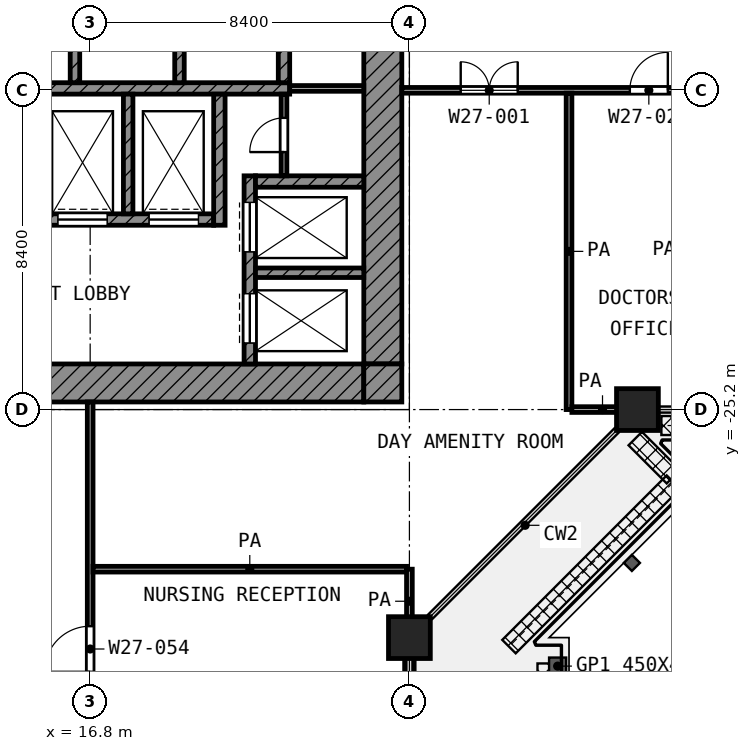
"""IFC4 building model, lengths in metres.
Left out: names, types, materials, properties, quantities, classifications, styles, units other than length and angle.
Written with IfcOpenShell. Run it as: python <this file> out.ifc"""

import sys

from ifc_helpers import new_model, si_unit, direction, frame, frame_2d, origin, origin_2d, place, context, subcontext, project, spatial, rectangle, extrude, element, fill, save


model = new_model("IFC4")
c1 = context("Model", 3, precision=1e-05, world=origin(), true_north=direction((0.0, 1.0)))
c2 = subcontext(c1, "Body", "Model", "MODEL_VIEW")
j1 = project(units=[si_unit("LENGTHUNIT", "METRE"), si_unit("PLANEANGLEUNIT", "RADIAN")], contexts=[c1])
p1 = place(None, origin())
s1 = spatial("IfcSite", under=j1, at=p1, CompositionType="ELEMENT")
p2 = place(p1, origin())
s2 = spatial("IfcBuilding", under=s1, at=p2, CompositionType="ELEMENT")
p3 = place(p2, frame((0.0, 0.0, 140.8)))
s3 = spatial("IfcBuildingStorey", under=s2, at=p3, CompositionType="ELEMENT", Elevation=140.8)
for number, where, z_axis, x_axis in (
    (1, (31.2, -25.2, 0.0), (0.0, 0.0, 1.0), (1.0, 0.0, 0.0)),
    (2, (25.2, -31.2, 0.0), (0.0, 0.0, 1.0), (1.0, 0.0, 0.0)),
):
    element("IfcColumn", number, at=place(p3, frame(where, z_axis=z_axis, x_axis=x_axis)), inside=s3, PredefinedType="COLUMN", context=c2, shape_type="SweptSolid", body=[
        extrude(rectangle(XDim=1.1, YDim=1.1, at=origin_2d()), origin(), (0.0, 0.0, 1.0), 4.2),
    ])
p4 = place(p3, frame((25.2, -34.992, 0.0), z_axis=(0.0, 0.0, 1.0), x_axis=(0.0, 1.0, 0.0)))
e3 = element("IfcWall", 3, at=p4, inside=s3, PredefinedType="SOLIDWALL", context=c2, shape_type="SweptSolid", body=[
    extrude(rectangle(XDim=3.242, YDim=0.25, at=frame_2d((1.621, 0.0))), origin(), (0.0, 0.0, 1.0), 3.48),
])
p5 = place(p4, frame((1.621, 0.0, 0.0)))
e4 = element("IfcOpeningElement", 4, at=p5, cuts=e3, PredefinedType="OPENING", context=c2, shape_type="SweptSolid", body=[
    extrude(rectangle(XDim=1.0, YDim=2.1, at=frame_2d((0.5, 1.05))), frame((0.0, 0.135, 0.0), z_axis=(0.0, -1.0, 0.0), x_axis=(1.0, 0.0, 0.0)), (0.0, 0.0, 1.0), 0.27),
])
p6 = place(p3, frame((24.5, -24.0, 0.0), z_axis=(0.0, 0.0, 1.0), x_axis=(0.0, 1.0, 0.0)))
e5 = element("IfcWall", 5, at=p6, inside=s3, PredefinedType="SHEAR", context=c2, shape_type="SweptSolid", body=[
    extrude(rectangle(XDim=18.6, YDim=1.0, at=frame_2d((9.3, 0.0))), origin(), (0.0, 0.0, 1.0), 3.6),
])
p7 = place(p6, frame((10.5, 0.0, 0.0)))
e6 = element("IfcOpeningElement", 6, at=p7, cuts=e5, PredefinedType="OPENING", context=c2, shape_type="SweptSolid", body=[
    extrude(rectangle(XDim=1.8, YDim=2.1, at=frame_2d((0.9, 1.05))), frame((0.0, 0.51, 0.0), z_axis=(0.0, -1.0, 0.0), x_axis=(1.0, 0.0, 0.0)), (0.0, 0.0, 1.0), 1.02),
])
p8 = place(p3, frame((5.4, -24.5, 0.0), z_axis=(0.0, 0.0, 1.0), x_axis=(1.0, 0.0, 0.0)))
e7 = element("IfcWall", 7, at=p8, inside=s3, PredefinedType="SHEAR", context=c2, shape_type="SweptSolid", body=[
    extrude(rectangle(XDim=18.6, YDim=1.0, at=frame_2d((9.3, 0.0))), origin(), (0.0, 0.0, 1.0), 3.6),
])
p9 = place(p8, frame((6.3, 0.0, 0.0)))
e8 = element("IfcOpeningElement", 8, at=p9, cuts=e7, PredefinedType="OPENING", context=c2, shape_type="SweptSolid", body=[
    extrude(rectangle(XDim=1.8, YDim=2.1, at=frame_2d((0.9, 1.05))), frame((0.0, 0.51, 0.0), z_axis=(0.0, -1.0, 0.0), x_axis=(1.0, 0.0, 0.0)), (0.0, 0.0, 1.0), 1.02),
])
p10 = place(p3, frame((24.5, -25.0, 0.0), z_axis=(0.0, 0.0, 1.0), x_axis=(0.0, 1.0, 0.0)))
e9 = element("IfcWall", 9, at=p10, inside=s3, PredefinedType="SHEAR", context=c2, shape_type="SweptSolid", body=[
    extrude(rectangle(XDim=1.0, YDim=1.0, at=frame_2d((0.5, 0.0))), origin(), (0.0, 0.0, 1.0), 3.6),
])
p11 = place(p3, frame((5.4, -16.75, 0.0), z_axis=(0.0, 0.0, 1.0), x_axis=(1.0, 0.0, 0.0)))
e10 = element("IfcWall", 10, at=p11, inside=s3, PredefinedType="SHEAR", context=c2, shape_type="SweptSolid", body=[
    extrude(rectangle(XDim=16.65, YDim=0.3, at=frame_2d((8.325, 0.0))), origin(), (0.0, 0.0, 1.0), 3.6),
])
p12 = place(p3, frame((5.4, -20.2, 0.0), z_axis=(0.0, 0.0, 1.0), x_axis=(1.0, 0.0, 0.0)))
e11 = element("IfcWall", 11, at=p12, inside=s3, PredefinedType="SHEAR", context=c2, shape_type="SweptSolid", body=[
    extrude(rectangle(XDim=14.65, YDim=0.3, at=frame_2d((7.325, 0.0))), origin(), (0.0, 0.0, 1.0), 3.6),
])
p13 = place(p12, frame((10.55, 0.0, 0.0)))
e12 = element("IfcOpeningElement", 12, at=p13, cuts=e11, PredefinedType="OPENING", context=c2, shape_type="SweptSolid", body=[
    extrude(rectangle(XDim=1.3, YDim=2.1, at=frame_2d((0.65, 1.05))), frame((0.0, 0.16, 0.0), z_axis=(0.0, -1.0, 0.0), x_axis=(1.0, 0.0, 0.0)), (0.0, 0.0, 1.0), 0.32),
])
p14 = place(p12, frame((12.95, 0.0, 0.0)))
e13 = element("IfcOpeningElement", 13, at=p14, cuts=e11, PredefinedType="OPENING", context=c2, shape_type="SweptSolid", body=[
    extrude(rectangle(XDim=1.3, YDim=2.1, at=frame_2d((0.65, 1.05))), frame((0.0, 0.16, 0.0), z_axis=(0.0, -1.0, 0.0), x_axis=(1.0, 0.0, 0.0)), (0.0, 0.0, 1.0), 0.32),
])
p15 = place(p12, frame((0.55, 0.0, 0.0)))
e14 = element("IfcOpeningElement", 14, at=p15, cuts=e11, PredefinedType="OPENING", context=c2, shape_type="SweptSolid", body=[
    extrude(rectangle(XDim=1.3, YDim=2.1, at=frame_2d((0.65, 1.05))), frame((0.0, 0.16, 0.0), z_axis=(0.0, -1.0, 0.0), x_axis=(1.0, 0.0, 0.0)), (0.0, 0.0, 1.0), 0.32),
])
p16 = place(p12, frame((2.95, 0.0, 0.0)))
e15 = element("IfcOpeningElement", 15, at=p16, cuts=e11, PredefinedType="OPENING", context=c2, shape_type="SweptSolid", body=[
    extrude(rectangle(XDim=1.3, YDim=2.1, at=frame_2d((0.65, 1.05))), frame((0.0, 0.16, 0.0), z_axis=(0.0, -1.0, 0.0), x_axis=(1.0, 0.0, 0.0)), (0.0, 0.0, 1.0), 0.32),
])
p17 = place(p12, frame((7.15, 0.0, 0.0)))
e16 = element("IfcOpeningElement", 16, at=p17, cuts=e11, PredefinedType="OPENING", context=c2, shape_type="SweptSolid", body=[
    extrude(rectangle(XDim=0.9, YDim=2.1, at=frame_2d((0.45, 1.05))), frame((0.0, 0.16, 0.0), z_axis=(0.0, -1.0, 0.0), x_axis=(1.0, 0.0, 0.0)), (0.0, 0.0, 1.0), 0.32),
])
p18 = place(p3, frame((20.2, -20.35, 0.0), z_axis=(0.0, 0.0, 1.0), x_axis=(0.0, 1.0, 0.0)))
e17 = element("IfcWall", 17, at=p18, inside=s3, PredefinedType="SHEAR", context=c2, shape_type="SweptSolid", body=[
    extrude(rectangle(XDim=3.45, YDim=0.3, at=frame_2d((1.725, 0.0))), origin(), (0.0, 0.0, 1.0), 3.6),
])
p19 = place(p3, frame((21.9, -16.6, 0.0), z_axis=(0.0, 0.0, 1.0), x_axis=(0.0, 1.0, 0.0)))
e18 = element("IfcWall", 18, at=p19, inside=s3, PredefinedType="SHEAR", context=c2, shape_type="SweptSolid", body=[
    extrude(rectangle(XDim=2.35, YDim=0.3, at=frame_2d((1.175, 0.0))), origin(), (0.0, 0.0, 1.0), 3.6),
])
p20 = place(p3, frame((21.15, -19.2, 0.0), z_axis=(0.0, 0.0, 1.0), x_axis=(1.0, 0.0, 0.0)))
e19 = element("IfcWall", 19, at=p20, inside=s3, PredefinedType="SHEAR", context=c2, shape_type="SweptSolid", body=[
    extrude(rectangle(XDim=2.85, YDim=0.3, at=frame_2d((1.425, 0.0))), origin(), (0.0, 0.0, 1.0), 3.6),
])
p21 = place(p3, frame((21.0, -24.0, 0.0), z_axis=(0.0, 0.0, 1.0), x_axis=(0.0, 1.0, 0.0)))
e20 = element("IfcWall", 20, at=p21, inside=s3, PredefinedType="SHEAR", context=c2, shape_type="SweptSolid", body=[
    extrude(rectangle(XDim=4.95, YDim=0.3, at=frame_2d((2.475, 0.0))), origin(), (0.0, 0.0, 1.0), 3.6),
])
p22 = place(p21, frame((2.95, 0.0, 0.0)))
e21 = element("IfcOpeningElement", 21, at=p22, cuts=e20, PredefinedType="OPENING", context=c2, shape_type="SweptSolid", body=[
    extrude(rectangle(XDim=1.3, YDim=2.1, at=frame_2d((0.65, 1.05))), frame((0.0, 0.16, 0.0), z_axis=(0.0, -1.0, 0.0), x_axis=(1.0, 0.0, 0.0)), (0.0, 0.0, 1.0), 0.32),
])
p23 = place(p21, frame((0.55, 0.0, 0.0)))
e22 = element("IfcOpeningElement", 22, at=p23, cuts=e20, PredefinedType="OPENING", context=c2, shape_type="SweptSolid", body=[
    extrude(rectangle(XDim=1.3, YDim=2.1, at=frame_2d((0.65, 1.05))), frame((0.0, 0.16, 0.0), z_axis=(0.0, -1.0, 0.0), x_axis=(1.0, 0.0, 0.0)), (0.0, 0.0, 1.0), 0.32),
])
p24 = place(p3, frame((21.15, -21.6, 0.0), z_axis=(0.0, 0.0, 1.0), x_axis=(1.0, 0.0, 0.0)))
e23 = element("IfcWall", 23, at=p24, inside=s3, PredefinedType="SHEAR", context=c2, shape_type="SweptSolid", body=[
    extrude(rectangle(XDim=2.85, YDim=0.25, at=frame_2d((1.425, 0.0))), origin(), (0.0, 0.0, 1.0), 3.6),
])
p25 = place(p3, frame((17.8, -20.05, 0.0), z_axis=(0.0, 0.0, 1.0), x_axis=(0.0, 1.0, 0.0)))
e24 = element("IfcWall", 24, at=p25, inside=s3, PredefinedType="SHEAR", context=c2, shape_type="SweptSolid", body=[
    extrude(rectangle(XDim=3.15, YDim=0.25, at=frame_2d((1.575, 0.0))), origin(), (0.0, 0.0, 1.0), 3.6),
])
for number, where, z_axis, x_axis in (
    (25, (16.4, -16.6, 0.0), (0.0, 0.0, 1.0), (0.0, 1.0, 0.0)),
    (26, (19.15, -16.6, 0.0), (0.0, 0.0, 1.0), (0.0, 1.0, 0.0)),
):
    element("IfcWall", number, at=place(p3, frame(where, z_axis=z_axis, x_axis=x_axis)), inside=s3, PredefinedType="SHEAR", context=c2, shape_type="SweptSolid", body=[
        extrude(rectangle(XDim=2.35, YDim=0.25, at=frame_2d((1.175, 0.0))), origin(), (0.0, 0.0, 1.0), 3.6),
    ])
p26 = place(p3, frame((21.9, -19.05, 0.0), z_axis=(0.0, 0.0, 1.0), x_axis=(0.0, 1.0, 0.0)))
e27 = element("IfcWall", 27, at=p26, inside=s3, PredefinedType="PARTITIONING", context=c2, shape_type="SweptSolid", body=[
    extrude(rectangle(XDim=2.15, YDim=0.15, at=frame_2d((1.075, 0.0))), origin(), (0.0, 0.0, 1.0), 3.6),
])
p27 = place(p26, frame((0.625, 0.0, 0.0)))
e28 = element("IfcOpeningElement", 28, at=p27, cuts=e27, PredefinedType="OPENING", context=c2, shape_type="SweptSolid", body=[
    extrude(rectangle(XDim=0.9, YDim=2.1, at=frame_2d((0.45, 1.05))), frame((0.0, 0.085, 0.0), z_axis=(0.0, -1.0, 0.0), x_axis=(1.0, 0.0, 0.0)), (0.0, 0.0, 1.0), 0.17),
])
p28 = place(p3, frame((22.05, -16.75, 0.0), z_axis=(0.0, 0.0, 1.0), x_axis=(1.0, 0.0, 0.0)))
e29 = element("IfcWall", 29, at=p28, inside=s3, PredefinedType="PARTITIONING", context=c2, shape_type="SweptSolid", body=[
    extrude(rectangle(XDim=1.95, YDim=0.15, at=frame_2d((0.975, 0.0))), origin(), (0.0, 0.0, 1.0), 3.6),
])
p29 = place(p3, frame((16.875, -29.4, 0.0), z_axis=(0.0, 0.0, 1.0), x_axis=(1.0, 0.0, 0.0)))
e30 = element("IfcWall", 30, at=p29, inside=s3, PredefinedType="PARTITIONING", context=c2, shape_type="SweptSolid", body=[
    extrude(rectangle(XDim=8.25, YDim=0.15, at=frame_2d((4.125, 0.0))), origin(), (0.0, 0.0, 1.0), 3.6),
])
p30 = place(p3, frame((29.475, -25.2, 0.0), z_axis=(0.0, 0.0, 1.0), x_axis=(1.0, 0.0, 0.0)))
e31 = element("IfcWall", 31, at=p30, inside=s3, PredefinedType="PARTITIONING", context=c2, shape_type="SweptSolid", body=[
    extrude(rectangle(XDim=1.612, YDim=0.15, at=frame_2d((0.806, 0.0))), origin(), (0.0, 0.0, 1.0), 3.6),
])
p31 = place(p3, frame((25.0, -16.8, 0.0), z_axis=(0.0, 0.0, 1.0), x_axis=(1.0, 0.0, 0.0)))
e32 = element("IfcWall", 32, at=p31, inside=s3, PredefinedType="PARTITIONING", context=c2, shape_type="SweptSolid", body=[
    extrude(rectangle(XDim=50.52, YDim=0.15, at=frame_2d((25.26, 0.0))), origin(), (0.0, 0.0, 1.0), 3.6),
])
p32 = place(p31, frame((1.55, 0.0, 0.0)))
e33 = element("IfcOpeningElement", 33, at=p32, cuts=e32, PredefinedType="OPENING", context=c2, shape_type="SweptSolid", body=[
    extrude(rectangle(XDim=1.5, YDim=2.1, at=frame_2d((0.75, 1.05))), frame((0.0, 0.085, 0.0), z_axis=(0.0, -1.0, 0.0), x_axis=(1.0, 0.0, 0.0)), (0.0, 0.0, 1.0), 0.17),
])
p33 = place(p31, frame((6.0, 0.0, 0.0)))
e34 = element("IfcOpeningElement", 34, at=p33, cuts=e32, PredefinedType="OPENING", context=c2, shape_type="SweptSolid", body=[
    extrude(rectangle(XDim=1.0, YDim=2.1, at=frame_2d((0.5, 1.05))), frame((0.0, 0.085, 0.0), z_axis=(0.0, -1.0, 0.0), x_axis=(1.0, 0.0, 0.0)), (0.0, 0.0, 1.0), 0.17),
])
p34 = place(p31, frame((9.3, 0.0, 0.0)))
e35 = element("IfcOpeningElement", 35, at=p34, cuts=e32, PredefinedType="OPENING", context=c2, shape_type="SweptSolid", body=[
    extrude(rectangle(XDim=1.2, YDim=2.1, at=frame_2d((0.6, 1.05))), frame((0.0, 0.085, 0.0), z_axis=(0.0, -1.0, 0.0), x_axis=(1.0, 0.0, 0.0)), (0.0, 0.0, 1.0), 0.17),
])
p35 = place(p31, frame((17.9, 0.0, 0.0)))
e36 = element("IfcOpeningElement", 36, at=p35, cuts=e32, PredefinedType="OPENING", context=c2, shape_type="SweptSolid", body=[
    extrude(rectangle(XDim=1.2, YDim=2.1, at=frame_2d((0.6, 1.05))), frame((0.0, 0.085, 0.0), z_axis=(0.0, -1.0, 0.0), x_axis=(1.0, 0.0, 0.0)), (0.0, 0.0, 1.0), 0.17),
])
p36 = place(p31, frame((15.2, 0.0, 0.0)))
e37 = element("IfcOpeningElement", 37, at=p36, cuts=e32, PredefinedType="OPENING", context=c2, shape_type="SweptSolid", body=[
    extrude(rectangle(XDim=1.2, YDim=2.1, at=frame_2d((0.6, 1.05))), frame((0.0, 0.085, 0.0), z_axis=(0.0, -1.0, 0.0), x_axis=(1.0, 0.0, 0.0)), (0.0, 0.0, 1.0), 0.17),
])
p37 = place(p31, frame((20.15, 0.0, 0.0)))
e38 = element("IfcOpeningElement", 38, at=p37, cuts=e32, PredefinedType="OPENING", context=c2, shape_type="SweptSolid", body=[
    extrude(rectangle(XDim=1.2, YDim=2.1, at=frame_2d((0.6, 1.05))), frame((0.0, 0.085, 0.0), z_axis=(0.0, -1.0, 0.0), x_axis=(1.0, 0.0, 0.0)), (0.0, 0.0, 1.0), 0.17),
])
p38 = place(p31, frame((26.025, 0.0, 0.0)))
e39 = element("IfcOpeningElement", 39, at=p38, cuts=e32, PredefinedType="OPENING", context=c2, shape_type="SweptSolid", body=[
    extrude(rectangle(XDim=0.9, YDim=2.1, at=frame_2d((0.45, 1.05))), frame((0.0, 0.085, 0.0), z_axis=(0.0, -1.0, 0.0), x_axis=(1.0, 0.0, 0.0)), (0.0, 0.0, 1.0), 0.17),
])
p39 = place(p31, frame((27.65, 0.0, 0.0)))
e40 = element("IfcOpeningElement", 40, at=p39, cuts=e32, PredefinedType="OPENING", context=c2, shape_type="SweptSolid", body=[
    extrude(rectangle(XDim=1.2, YDim=2.1, at=frame_2d((0.6, 1.05))), frame((0.0, 0.085, 0.0), z_axis=(0.0, -1.0, 0.0), x_axis=(1.0, 0.0, 0.0)), (0.0, 0.0, 1.0), 0.17),
])
p40 = place(p31, frame((32.0, 0.0, 0.0)))
e41 = element("IfcOpeningElement", 41, at=p40, cuts=e32, PredefinedType="OPENING", context=c2, shape_type="SweptSolid", body=[
    extrude(rectangle(XDim=1.2, YDim=2.1, at=frame_2d((0.6, 1.05))), frame((0.0, 0.085, 0.0), z_axis=(0.0, -1.0, 0.0), x_axis=(1.0, 0.0, 0.0)), (0.0, 0.0, 1.0), 0.17),
])
p41 = place(p31, frame((34.8, 0.0, 0.0)))
e42 = element("IfcOpeningElement", 42, at=p41, cuts=e32, PredefinedType="OPENING", context=c2, shape_type="SweptSolid", body=[
    extrude(rectangle(XDim=1.2, YDim=2.1, at=frame_2d((0.6, 1.05))), frame((0.0, 0.085, 0.0), z_axis=(0.0, -1.0, 0.0), x_axis=(1.0, 0.0, 0.0)), (0.0, 0.0, 1.0), 0.17),
])
p42 = place(p31, frame((40.625, 0.0, 0.0)))
e43 = element("IfcOpeningElement", 43, at=p42, cuts=e32, PredefinedType="OPENING", context=c2, shape_type="SweptSolid", body=[
    extrude(rectangle(XDim=0.9, YDim=2.1, at=frame_2d((0.45, 1.05))), frame((0.0, 0.085, 0.0), z_axis=(0.0, -1.0, 0.0), x_axis=(1.0, 0.0, 0.0)), (0.0, 0.0, 1.0), 0.17),
])
p43 = place(p31, frame((44.15, 0.0, 0.0)))
e44 = element("IfcOpeningElement", 44, at=p43, cuts=e32, PredefinedType="OPENING", context=c2, shape_type="SweptSolid", body=[
    extrude(rectangle(XDim=1.2, YDim=2.1, at=frame_2d((0.6, 1.05))), frame((0.0, 0.085, 0.0), z_axis=(0.0, -1.0, 0.0), x_axis=(1.0, 0.0, 0.0)), (0.0, 0.0, 1.0), 0.17),
])
p44 = place(p31, frame((47.7, 0.0, 0.0)))
e45 = element("IfcOpeningElement", 45, at=p44, cuts=e32, PredefinedType="OPENING", context=c2, shape_type="SweptSolid", body=[
    extrude(rectangle(XDim=1.0, YDim=2.1, at=frame_2d((0.5, 1.05))), frame((0.0, 0.085, 0.0), z_axis=(0.0, -1.0, 0.0), x_axis=(1.0, 0.0, 0.0)), (0.0, 0.0, 1.0), 0.17),
])
p45 = place(p3, frame((16.8, -58.72, 0.0), z_axis=(0.0, 0.0, 1.0), x_axis=(0.0, 1.0, 0.0)))
e46 = element("IfcWall", 46, at=p45, inside=s3, PredefinedType="PARTITIONING", context=c2, shape_type="SweptSolid", body=[
    extrude(rectangle(XDim=33.72, YDim=0.15, at=frame_2d((16.86, 0.0))), origin(), (0.0, 0.0, 1.0), 2.7),
])
p46 = place(p45, frame((26.62, 0.0, 0.0)))
e47 = element("IfcOpeningElement", 47, at=p46, cuts=e46, PredefinedType="OPENING", context=c2, shape_type="SweptSolid", body=[
    extrude(rectangle(XDim=1.2, YDim=2.1, at=frame_2d((0.6, 1.05))), frame((0.0, 0.085, 0.0), z_axis=(0.0, -1.0, 0.0), x_axis=(1.0, 0.0, 0.0)), (0.0, 0.0, 1.0), 0.17),
])
p47 = place(p45, frame((22.52, 0.0, 0.0)))
e48 = element("IfcOpeningElement", 48, at=p47, cuts=e46, PredefinedType="OPENING", context=c2, shape_type="SweptSolid", body=[
    extrude(rectangle(XDim=1.0, YDim=2.1, at=frame_2d((0.5, 1.05))), frame((0.0, 0.085, 0.0), z_axis=(0.0, -1.0, 0.0), x_axis=(1.0, 0.0, 0.0)), (0.0, 0.0, 1.0), 0.17),
])
p48 = place(p45, frame((17.42, 0.0, 0.0)))
e49 = element("IfcOpeningElement", 49, at=p48, cuts=e46, PredefinedType="OPENING", context=c2, shape_type="SweptSolid", body=[
    extrude(rectangle(XDim=1.2, YDim=2.1, at=frame_2d((0.6, 1.05))), frame((0.0, 0.085, 0.0), z_axis=(0.0, -1.0, 0.0), x_axis=(1.0, 0.0, 0.0)), (0.0, 0.0, 1.0), 0.17),
])
p49 = place(p45, frame((10.12, 0.0, 0.0)))
e50 = element("IfcOpeningElement", 50, at=p49, cuts=e46, PredefinedType="OPENING", context=c2, shape_type="SweptSolid", body=[
    extrude(rectangle(XDim=1.2, YDim=2.1, at=frame_2d((0.6, 1.05))), frame((0.0, 0.085, 0.0), z_axis=(0.0, -1.0, 0.0), x_axis=(1.0, 0.0, 0.0)), (0.0, 0.0, 1.0), 0.17),
])
p50 = place(p45, frame((14.32, 0.0, 0.0)))
e51 = element("IfcOpeningElement", 51, at=p50, cuts=e46, PredefinedType="OPENING", context=c2, shape_type="SweptSolid", body=[
    extrude(rectangle(XDim=1.2, YDim=2.1, at=frame_2d((0.6, 1.05))), frame((0.0, 0.085, 0.0), z_axis=(0.0, -1.0, 0.0), x_axis=(1.0, 0.0, 0.0)), (0.0, 0.0, 1.0), 0.17),
])
p51 = place(p45, frame((3.37, 0.0, 0.0)))
e52 = element("IfcOpeningElement", 52, at=p51, cuts=e46, PredefinedType="OPENING", context=c2, shape_type="SweptSolid", body=[
    extrude(rectangle(XDim=1.5, YDim=2.1, at=frame_2d((0.75, 1.05))), frame((0.0, 0.085, 0.0), z_axis=(0.0, -1.0, 0.0), x_axis=(1.0, 0.0, 0.0)), (0.0, 0.0, 1.0), 0.17),
])
p52 = place(p3, frame((25.2, -31.087, 0.0), z_axis=(0.0, 0.0, 1.0), x_axis=(0.0, 1.0, 0.0)))
e53 = element("IfcWall", 53, at=p52, inside=s3, PredefinedType="PARTITIONING", context=c2, shape_type="SweptSolid", body=[
    extrude(rectangle(XDim=1.687, YDim=0.15, at=frame_2d((0.844, 0.0))), origin(), (0.0, 0.0, 1.0), 3.6),
])
p53 = place(p3, frame((29.4, -25.2, 0.0), z_axis=(0.0, 0.0, 1.0), x_axis=(0.0, 1.0, 0.0)))
e54 = element("IfcWall", 54, at=p53, inside=s3, PredefinedType="PARTITIONING", context=c2, shape_type="SweptSolid", body=[
    extrude(rectangle(XDim=8.325, YDim=0.15, at=frame_2d((4.163, 0.0))), origin(), (0.0, 0.0, 1.0), 3.6),
])
p54 = place(p22, origin())
e55 = element("IfcDoor", 55, at=p54, inside=s3, OperationType="DOUBLE_DOOR_SLIDING", PredefinedType="DOOR", context=c2, shape_type="SweptSolid", body=[
    extrude(rectangle(XDim=1.3, YDim=2.1, at=frame_2d((0.65, 1.05))), frame((0.0, 0.025, 0.0), z_axis=(0.0, -1.0, 0.0), x_axis=(1.0, 0.0, 0.0)), (0.0, 0.0, 1.0), 0.05),
])
fill(e21, e55)
p55 = place(p23, origin())
e56 = element("IfcDoor", 56, at=p55, inside=s3, OperationType="DOUBLE_DOOR_SLIDING", PredefinedType="DOOR", context=c2, shape_type="SweptSolid", body=[
    extrude(rectangle(XDim=1.3, YDim=2.1, at=frame_2d((0.65, 1.05))), frame((0.0, 0.025, 0.0), z_axis=(0.0, -1.0, 0.0), x_axis=(1.0, 0.0, 0.0)), (0.0, 0.0, 1.0), 0.05),
])
fill(e22, e56)
p56 = place(p13, origin())
e57 = element("IfcDoor", 57, at=p56, inside=s3, OperationType="DOUBLE_DOOR_SLIDING", PredefinedType="DOOR", context=c2, shape_type="SweptSolid", body=[
    extrude(rectangle(XDim=1.3, YDim=2.1, at=frame_2d((0.65, 1.05))), frame((0.0, 0.025, 0.0), z_axis=(0.0, -1.0, 0.0), x_axis=(1.0, 0.0, 0.0)), (0.0, 0.0, 1.0), 0.05),
])
fill(e12, e57)
p57 = place(p14, origin())
e58 = element("IfcDoor", 58, at=p57, inside=s3, OperationType="DOUBLE_DOOR_SLIDING", PredefinedType="DOOR", context=c2, shape_type="SweptSolid", body=[
    extrude(rectangle(XDim=1.3, YDim=2.1, at=frame_2d((0.65, 1.05))), frame((0.0, 0.025, 0.0), z_axis=(0.0, -1.0, 0.0), x_axis=(1.0, 0.0, 0.0)), (0.0, 0.0, 1.0), 0.05),
])
fill(e13, e58)
p58 = place(p27, origin())
e59 = element("IfcDoor", 59, at=p58, inside=s3, OperationType="SINGLE_SWING_LEFT", PredefinedType="DOOR", context=c2, shape_type="SweptSolid", body=[
    extrude(rectangle(XDim=0.9, YDim=2.1, at=frame_2d((0.45, 1.05))), frame((0.0, 0.025, 0.0), z_axis=(0.0, -1.0, 0.0), x_axis=(1.0, 0.0, 0.0)), (0.0, 0.0, 1.0), 0.05),
])
fill(e28, e59)
p59 = place(p32, origin())
e60 = element("IfcDoor", 60, at=p59, inside=s3, OperationType="DOUBLE_DOOR_SINGLE_SWING", PredefinedType="DOOR", context=c2, shape_type="SweptSolid", body=[
    extrude(rectangle(XDim=1.5, YDim=2.1, at=frame_2d((0.75, 1.05))), frame((0.0, 0.025, 0.0), z_axis=(0.0, -1.0, 0.0), x_axis=(1.0, 0.0, 0.0)), (0.0, 0.0, 1.0), 0.05),
])
fill(e33, e60)
p60 = place(p33, origin())
e61 = element("IfcDoor", 61, at=p60, inside=s3, OperationType="SINGLE_SWING_RIGHT", PredefinedType="DOOR", context=c2, shape_type="SweptSolid", body=[
    extrude(rectangle(XDim=1.0, YDim=2.1, at=frame_2d((0.5, 1.05))), frame((0.0, 0.025, 0.0), z_axis=(0.0, -1.0, 0.0), x_axis=(1.0, 0.0, 0.0)), (0.0, 0.0, 1.0), 0.05),
])
fill(e34, e61)
p61 = place(p46, origin())
e62 = element("IfcDoor", 62, at=p61, inside=s3, OperationType="SINGLE_SWING_LEFT", PredefinedType="DOOR", context=c2, shape_type="SweptSolid", body=[
    extrude(rectangle(XDim=1.2, YDim=2.1, at=frame_2d((0.6, 1.05))), frame((0.0, 0.025, 0.0), z_axis=(0.0, -1.0, 0.0), x_axis=(1.0, 0.0, 0.0)), (0.0, 0.0, 1.0), 0.05),
])
fill(e47, e62)
save(model, sys.argv[1])
